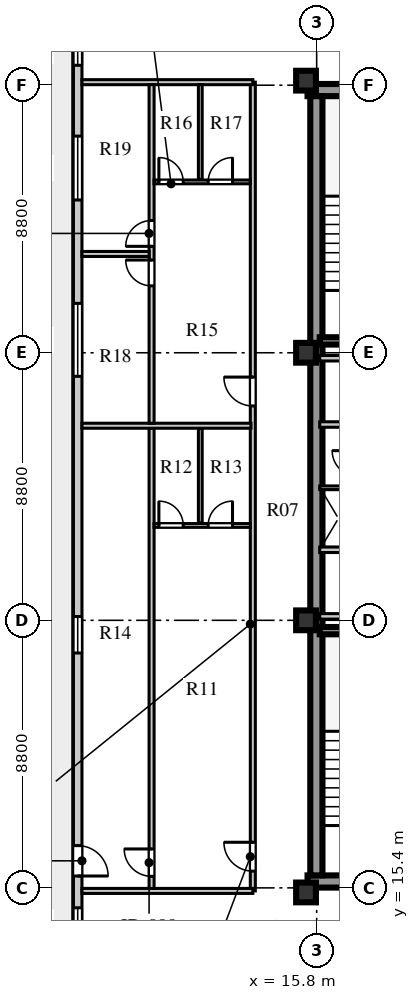
"""IFC4 building model, lengths in metres.
Left out: names, types, materials, properties, quantities, classifications, styles, units other than length and angle.
Written with IfcOpenShell. Run it as: python <this file> out.ifc"""

import sys

from ifc_helpers import new_model, si_unit, direction, frame, frame_2d, origin, origin_2d, place, context, subcontext, project, spatial, rectangle, extrude, element, fill, save


model = new_model("IFC4")
c1 = context("Model", 3, precision=1e-05, world=origin(), true_north=direction((0.0, 1.0)))
c2 = subcontext(c1, "Body", "Model", "MODEL_VIEW")
j1 = project(units=[si_unit("LENGTHUNIT", "METRE"), si_unit("PLANEANGLEUNIT", "RADIAN")], contexts=[c1])
p1 = place(None, origin())
s1 = spatial("IfcSite", under=j1, at=p1, CompositionType="ELEMENT")
p2 = place(p1, origin())
s2 = spatial("IfcBuilding", under=s1, at=p2, CompositionType="ELEMENT")
p3 = place(p2, frame((0.0, 0.0, 253.1)))
s3 = spatial("IfcBuildingStorey", under=s2, at=p3, CompositionType="ELEMENT", Elevation=253.1)
for number, where, z_axis, x_axis in (
    (1, (15.5, 15.61, 0.0), (0.0, 0.0, 1.0), (1.0, 0.0, 0.0)),
    (2, (15.5, 41.64, 0.0), (0.0, 0.0, 1.0), (1.0, 0.0, 0.0)),
):
    element("IfcWall", number, at=place(p3, frame(where, z_axis=z_axis, x_axis=x_axis)), inside=s3, PredefinedType="SHEAR", context=c2, shape_type="SweptSolid", body=[
        extrude(rectangle(XDim=9.48, YDim=0.4, at=frame_2d((4.74, 0.0))), origin(), (0.0, 0.0, 1.0), 3.66),
    ])
p4 = place(p3, frame((15.79, 15.81, 0.0), z_axis=(0.0, 0.0, 1.0), x_axis=(0.0, 1.0, 0.0)))
e3 = element("IfcWall", 3, at=p4, inside=s3, PredefinedType="SHEAR", context=c2, shape_type="SweptSolid", body=[
    extrude(rectangle(XDim=25.63, YDim=0.4, at=frame_2d((12.815, 0.0))), origin(), (0.0, 0.0, 1.0), 3.66),
])
for number, where, z_axis, x_axis in (
    (4, (15.45, 15.25, 0.0), (0.0, 0.0, 1.0), (1.0, 0.0, 0.0)),
    (5, (15.45, 24.2, 0.0), (0.0, 0.0, 1.0), (1.0, 0.0, 0.0)),
    (6, (15.45, 33.0, 0.0), (0.0, 0.0, 1.0), (1.0, 0.0, 0.0)),
    (7, (15.45, 41.95, 0.0), (0.0, 0.0, 1.0), (1.0, 0.0, 0.0)),
):
    element("IfcColumn", number, at=place(p3, frame(where, z_axis=z_axis, x_axis=x_axis)), inside=s3, PredefinedType="COLUMN", context=c2, shape_type="SweptSolid", body=[
        extrude(rectangle(XDim=0.65, YDim=0.65, at=origin_2d()), origin(), (0.0, 0.0, 1.0), 3.66),
    ])
p5 = place(p3, frame((7.94, 44.07, 0.0), z_axis=(0.0, 0.0, 1.0), x_axis=(0.0, -1.0, 0.0)))
e8 = element("IfcWall", 8, at=p5, inside=s3, PredefinedType="STANDARD", context=c2, shape_type="SweptSolid", body=[
    extrude(rectangle(XDim=30.94, YDim=0.28, at=frame_2d((15.47, 0.0))), origin(), (0.0, 0.0, 1.0), 3.66),
])
p6 = place(p5, frame((29.325, 0.0, 0.8)))
e9 = element("IfcOpeningElement", 9, at=p6, cuts=e8, PredefinedType="OPENING", context=c2, shape_type="SweptSolid", body=[
    extrude(rectangle(XDim=0.95, YDim=1.65, at=frame_2d((0.475, 0.825))), frame((0.0, 0.15, 0.0), z_axis=(0.0, -1.0, 0.0), x_axis=(1.0, 0.0, 0.0)), (0.0, 0.0, 1.0), 0.3),
])
p7 = place(p5, frame((27.28, 0.0, 0.0)))
e10 = element("IfcOpeningElement", 10, at=p7, cuts=e8, PredefinedType="OPENING", context=c2, shape_type="SweptSolid", body=[
    extrude(rectangle(XDim=1.0, YDim=2.05, at=frame_2d((0.5, 1.025))), frame((0.0, 0.15, 0.0), z_axis=(0.0, -1.0, 0.0), x_axis=(1.0, 0.0, 0.0)), (0.0, 0.0, 1.0), 0.3),
])
p8 = place(p5, frame((19.745, 0.0, 0.8)))
e11 = element("IfcOpeningElement", 11, at=p8, cuts=e8, PredefinedType="OPENING", context=c2, shape_type="SweptSolid", body=[
    extrude(rectangle(XDim=1.2, YDim=1.75, at=frame_2d((0.6, 0.875))), frame((0.0, 0.15, 0.0), z_axis=(0.0, -1.0, 0.0), x_axis=(1.0, 0.0, 0.0)), (0.0, 0.0, 1.0), 0.3),
])
p9 = place(p5, frame((9.445, 0.0, 0.8)))
e12 = element("IfcOpeningElement", 12, at=p9, cuts=e8, PredefinedType="OPENING", context=c2, shape_type="SweptSolid", body=[
    extrude(rectangle(XDim=2.4, YDim=2.05, at=frame_2d((1.2, 1.025))), frame((0.0, 0.15, 0.0), z_axis=(0.0, -1.0, 0.0), x_axis=(1.0, 0.0, 0.0)), (0.0, 0.0, 1.0), 0.3),
])
p10 = place(p5, frame((3.945, 0.0, 0.8)))
e13 = element("IfcOpeningElement", 13, at=p10, cuts=e8, PredefinedType="OPENING", context=c2, shape_type="SweptSolid", body=[
    extrude(rectangle(XDim=2.1, YDim=1.95, at=frame_2d((1.05, 0.975))), frame((0.0, 0.15, 0.0), z_axis=(0.0, -1.0, 0.0), x_axis=(1.0, 0.0, 0.0)), (0.0, 0.0, 1.0), 0.3),
])
p11 = place(p5, frame((0.665, 0.0, 0.8)))
e14 = element("IfcOpeningElement", 14, at=p11, cuts=e8, PredefinedType="OPENING", context=c2, shape_type="SweptSolid", body=[
    extrude(rectangle(XDim=0.95, YDim=1.65, at=frame_2d((0.475, 0.825))), frame((0.0, 0.15, 0.0), z_axis=(0.0, -1.0, 0.0), x_axis=(1.0, 0.0, 0.0)), (0.0, 0.0, 1.0), 0.3),
])
p12 = place(p3, frame((15.9, 23.86, 0.0), z_axis=(0.0, 0.0, 1.0), x_axis=(1.0, 0.0, 0.0)))
e15 = element("IfcWall", 15, at=p12, inside=s3, PredefinedType="SHEAR", context=c2, shape_type="SweptSolid", body=[
    extrude(rectangle(XDim=3.52, YDim=0.24, at=frame_2d((1.76, 0.0))), origin(), (0.0, 0.0, 1.0), 3.9),
])
p13 = place(p3, frame((15.9, 26.52, 0.0), z_axis=(0.0, 0.0, 1.0), x_axis=(1.0, 0.0, 0.0)))
e16 = element("IfcWall", 16, at=p13, inside=s3, PredefinedType="SOLIDWALL", context=c2, shape_type="SweptSolid", body=[
    extrude(rectangle(XDim=8.68, YDim=0.18, at=frame_2d((4.34, 0.0))), origin(), (0.0, 0.0, 1.0), 3.66),
])
p14 = place(p13, frame((2.05, 0.0, 0.0)))
e17 = element("IfcOpeningElement", 17, at=p14, cuts=e16, PredefinedType="OPENING", context=c2, shape_type="SweptSolid", body=[
    extrude(rectangle(XDim=0.85, YDim=2.06, at=frame_2d((0.425, 1.03))), frame((0.0, 0.1, 0.0), z_axis=(0.0, -1.0, 0.0), x_axis=(1.0, 0.0, 0.0)), (0.0, 0.0, 1.0), 0.2),
])
p15 = place(p13, frame((5.2, 0.0, 0.0)))
e18 = element("IfcOpeningElement", 18, at=p15, cuts=e16, PredefinedType="OPENING", context=c2, shape_type="SweptSolid", body=[
    extrude(rectangle(XDim=0.95, YDim=2.1, at=frame_2d((0.475, 1.05))), frame((0.0, 0.1, 0.0), z_axis=(0.0, -1.0, 0.0), x_axis=(1.0, 0.0, 0.0)), (0.0, 0.0, 1.0), 0.2),
])
p16 = place(p3, frame((15.9, 24.33, 0.0), z_axis=(0.0, 0.0, 1.0), x_axis=(1.0, 0.0, 0.0)))
e19 = element("IfcWall", 19, at=p16, inside=s3, PredefinedType="SOLIDWALL", context=c2, shape_type="SweptSolid", body=[
    extrude(rectangle(XDim=8.68, YDim=0.18, at=frame_2d((4.34, 0.0))), origin(), (0.0, 0.0, 1.0), 3.06),
])
p17 = place(p3, frame((15.9, 28.56, 0.0), z_axis=(0.0, 0.0, 1.0), x_axis=(1.0, 0.0, 0.0)))
e20 = element("IfcWall", 20, at=p17, inside=s3, PredefinedType="PARTITIONING", context=c2, shape_type="SweptSolid", body=[
    extrude(rectangle(XDim=1.2, YDim=0.12, at=frame_2d((0.6, 0.0))), origin(), (0.0, 0.0, 1.0), 3.66),
])
p18 = place(p3, frame((15.9, 30.64, 0.0), z_axis=(0.0, 0.0, 1.0), x_axis=(1.0, 0.0, 0.0)))
e21 = element("IfcWall", 21, at=p18, inside=s3, PredefinedType="SOLIDWALL", context=c2, shape_type="SweptSolid", body=[
    extrude(rectangle(XDim=8.68, YDim=0.18, at=frame_2d((4.34, 0.0))), origin(), (0.0, 0.0, 1.0), 3.66),
])
p19 = place(p18, frame((3.7, 0.0, 0.0)))
e22 = element("IfcOpeningElement", 22, at=p19, cuts=e21, PredefinedType="OPENING", context=c2, shape_type="SweptSolid", body=[
    extrude(rectangle(XDim=0.95, YDim=2.1, at=frame_2d((0.475, 1.05))), frame((0.0, 0.1, 0.0), z_axis=(0.0, -1.0, 0.0), x_axis=(1.0, 0.0, 0.0)), (0.0, 0.0, 1.0), 0.2),
])
p20 = place(p3, frame((15.9, 32.82, 0.0), z_axis=(0.0, 0.0, 1.0), x_axis=(1.0, 0.0, 0.0)))
e23 = element("IfcWall", 23, at=p20, inside=s3, PredefinedType="SOLIDWALL", context=c2, shape_type="SweptSolid", body=[
    extrude(rectangle(XDim=8.68, YDim=0.18, at=frame_2d((4.34, 0.0))), origin(), (0.0, 0.0, 1.0), 3.06),
])
p21 = place(p3, frame((15.9, 33.39, 0.0), z_axis=(0.0, 0.0, 1.0), x_axis=(1.0, 0.0, 0.0)))
e24 = element("IfcWall", 24, at=p21, inside=s3, PredefinedType="SHEAR", context=c2, shape_type="SweptSolid", body=[
    extrude(rectangle(XDim=3.52, YDim=0.24, at=frame_2d((1.76, 0.0))), origin(), (0.0, 0.0, 1.0), 3.9),
])
p22 = place(p3, frame((13.7, 15.3, 0.0), z_axis=(0.0, 0.0, 1.0), x_axis=(0.0, 1.0, 0.0)))
e25 = element("IfcWall", 25, at=p22, inside=s3, PredefinedType="PARTITIONING", context=c2, shape_type="SweptSolid", body=[
    extrude(rectangle(XDim=26.6, YDim=0.165, at=frame_2d((13.3, 0.0))), origin(), (0.0, 0.0, 1.0), 3.66),
])
p23 = place(p22, frame((0.65, 0.0, 0.0)))
e26 = element("IfcOpeningElement", 26, at=p23, cuts=e25, PredefinedType="OPENING", context=c2, shape_type="SweptSolid", body=[
    extrude(rectangle(XDim=0.95, YDim=2.1, at=frame_2d((0.475, 1.05))), frame((0.0, 0.093, 0.0), z_axis=(0.0, -1.0, 0.0), x_axis=(1.0, 0.0, 0.0)), (0.0, 0.0, 1.0), 0.185),
])
p24 = place(p22, frame((15.95, 0.0, 0.0)))
e27 = element("IfcOpeningElement", 27, at=p24, cuts=e25, PredefinedType="OPENING", context=c2, shape_type="SweptSolid", body=[
    extrude(rectangle(XDim=0.95, YDim=2.1, at=frame_2d((0.475, 1.05))), frame((0.0, 0.093, 0.0), z_axis=(0.0, -1.0, 0.0), x_axis=(1.0, 0.0, 0.0)), (0.0, 0.0, 1.0), 0.185),
])
for number, where, z_axis, x_axis in (
    (28, (8.08, 15.3, 0.0), (0.0, 0.0, 1.0), (1.0, 0.0, 0.0)),
    (29, (8.08, 41.9, 0.0), (0.0, 0.0, 1.0), (1.0, 0.0, 0.0)),
):
    element("IfcWall", number, at=place(p3, frame(where, z_axis=z_axis, x_axis=x_axis)), inside=s3, PredefinedType="PARTITIONING", context=c2, shape_type="SweptSolid", body=[
        extrude(rectangle(XDim=5.62, YDim=0.165, at=frame_2d((2.81, 0.0))), origin(), (0.0, 0.0, 1.0), 3.21),
    ])
p25 = place(p3, frame((10.37, 15.38, 0.0), z_axis=(0.0, 0.0, 1.0), x_axis=(0.0, 1.0, 0.0)))
e30 = element("IfcWall", 30, at=p25, inside=s3, PredefinedType="PARTITIONING", context=c2, shape_type="SweptSolid", body=[
    extrude(rectangle(XDim=15.14, YDim=0.165, at=frame_2d((7.57, 0.0))), origin(), (0.0, 0.0, 1.0), 3.66),
])
p26 = place(p25, frame((0.4, 0.0, 0.0)))
e31 = element("IfcOpeningElement", 31, at=p26, cuts=e30, PredefinedType="OPENING", context=c2, shape_type="SweptSolid", body=[
    extrude(rectangle(XDim=0.9, YDim=2.08, at=frame_2d((0.45, 1.04))), frame((0.0, 0.093, 0.0), z_axis=(0.0, -1.0, 0.0), x_axis=(1.0, 0.0, 0.0)), (0.0, 0.0, 1.0), 0.185),
])
p27 = place(p3, frame((10.45, 27.32, 0.0), z_axis=(0.0, 0.0, 1.0), x_axis=(1.0, 0.0, 0.0)))
e32 = element("IfcWall", 32, at=p27, inside=s3, PredefinedType="PLUMBINGWALL", context=c2, shape_type="SweptSolid", body=[
    extrude(rectangle(XDim=3.17, YDim=0.125, at=frame_2d((1.585, 0.0))), origin(), (0.0, 0.0, 1.0), 3.66),
])
p28 = place(p27, frame((0.16, 0.0, 0.0)))
e33 = element("IfcOpeningElement", 33, at=p28, cuts=e32, PredefinedType="OPENING", context=c2, shape_type="SweptSolid", body=[
    extrude(rectangle(XDim=0.8, YDim=2.05, at=frame_2d((0.4, 1.025))), frame((0.0, 0.073, 0.0), z_axis=(0.0, -1.0, 0.0), x_axis=(1.0, 0.0, 0.0)), (0.0, 0.0, 1.0), 0.145),
])
p29 = place(p27, frame((1.782, 0.0, 0.0)))
e34 = element("IfcOpeningElement", 34, at=p29, cuts=e32, PredefinedType="OPENING", context=c2, shape_type="SweptSolid", body=[
    extrude(rectangle(XDim=0.8, YDim=2.05, at=frame_2d((0.4, 1.025))), frame((0.0, 0.073, 0.0), z_axis=(0.0, -1.0, 0.0), x_axis=(1.0, 0.0, 0.0)), (0.0, 0.0, 1.0), 0.145),
])
p30 = place(p3, frame((11.972, 27.4, 0.0), z_axis=(0.0, 0.0, 1.0), x_axis=(0.0, 1.0, 0.0)))
e35 = element("IfcWall", 35, at=p30, inside=s3, PredefinedType="PLUMBINGWALL", context=c2, shape_type="SweptSolid", body=[
    extrude(rectangle(XDim=3.12, YDim=0.125, at=frame_2d((1.56, 0.0))), origin(), (0.0, 0.0, 1.0), 3.66),
])
p31 = place(p3, frame((8.08, 30.6, 0.0), z_axis=(0.0, 0.0, 1.0), x_axis=(1.0, 0.0, 0.0)))
e36 = element("IfcWall", 36, at=p31, inside=s3, PredefinedType="PARTITIONING", context=c2, shape_type="SweptSolid", body=[
    extrude(rectangle(XDim=5.56, YDim=0.165, at=frame_2d((2.78, 0.0))), origin(), (0.0, 0.0, 1.0), 3.66),
])
p32 = place(p3, frame((10.37, 30.68, 0.0), z_axis=(0.0, 0.0, 1.0), x_axis=(0.0, 1.0, 0.0)))
e37 = element("IfcWall", 37, at=p32, inside=s3, PredefinedType="PARTITIONING", context=c2, shape_type="SweptSolid", body=[
    extrude(rectangle(XDim=11.14, YDim=0.165, at=frame_2d((5.57, 0.0))), origin(), (0.0, 0.0, 1.0), 3.66),
])
p33 = place(p32, frame((4.52, 0.0, 0.0)))
e38 = element("IfcOpeningElement", 38, at=p33, cuts=e37, PredefinedType="OPENING", context=c2, shape_type="SweptSolid", body=[
    extrude(rectangle(XDim=0.85, YDim=2.08, at=frame_2d((0.425, 1.04))), frame((0.0, 0.093, 0.0), z_axis=(0.0, -1.0, 0.0), x_axis=(1.0, 0.0, 0.0)), (0.0, 0.0, 1.0), 0.185),
])
p34 = place(p32, frame((5.82, 0.0, 0.0)))
e39 = element("IfcOpeningElement", 39, at=p34, cuts=e37, PredefinedType="OPENING", context=c2, shape_type="SweptSolid", body=[
    extrude(rectangle(XDim=0.85, YDim=2.08, at=frame_2d((0.425, 1.04))), frame((0.0, 0.093, 0.0), z_axis=(0.0, -1.0, 0.0), x_axis=(1.0, 0.0, 0.0)), (0.0, 0.0, 1.0), 0.185),
])
p35 = place(p3, frame((10.45, 38.62, 0.0), z_axis=(0.0, 0.0, 1.0), x_axis=(1.0, 0.0, 0.0)))
e40 = element("IfcWall", 40, at=p35, inside=s3, PredefinedType="PLUMBINGWALL", context=c2, shape_type="SweptSolid", body=[
    extrude(rectangle(XDim=3.17, YDim=0.125, at=frame_2d((1.585, 0.0))), origin(), (0.0, 0.0, 1.0), 3.66),
])
p36 = place(p35, frame((0.16, 0.0, 0.0)))
e41 = element("IfcOpeningElement", 41, at=p36, cuts=e40, PredefinedType="OPENING", context=c2, shape_type="SweptSolid", body=[
    extrude(rectangle(XDim=0.8, YDim=2.05, at=frame_2d((0.4, 1.025))), frame((0.0, 0.073, 0.0), z_axis=(0.0, -1.0, 0.0), x_axis=(1.0, 0.0, 0.0)), (0.0, 0.0, 1.0), 0.145),
])
p37 = place(p35, frame((1.782, 0.0, 0.0)))
e42 = element("IfcOpeningElement", 42, at=p37, cuts=e40, PredefinedType="OPENING", context=c2, shape_type="SweptSolid", body=[
    extrude(rectangle(XDim=0.8, YDim=2.05, at=frame_2d((0.4, 1.025))), frame((0.0, 0.073, 0.0), z_axis=(0.0, -1.0, 0.0), x_axis=(1.0, 0.0, 0.0)), (0.0, 0.0, 1.0), 0.145),
])
p38 = place(p3, frame((11.972, 38.7, 0.0), z_axis=(0.0, 0.0, 1.0), x_axis=(0.0, 1.0, 0.0)))
e43 = element("IfcWall", 43, at=p38, inside=s3, PredefinedType="PLUMBINGWALL", context=c2, shape_type="SweptSolid", body=[
    extrude(rectangle(XDim=3.12, YDim=0.125, at=frame_2d((1.56, 0.0))), origin(), (0.0, 0.0, 1.0), 3.66),
])
p39 = place(p3, frame((8.08, 36.25, 0.0), z_axis=(0.0, 0.0, 1.0), x_axis=(1.0, 0.0, 0.0)))
e44 = element("IfcWall", 44, at=p39, inside=s3, PredefinedType="PARTITIONING", context=c2, shape_type="SweptSolid", body=[
    extrude(rectangle(XDim=2.21, YDim=0.165, at=frame_2d((1.105, 0.0))), origin(), (0.0, 0.0, 1.0), 3.66),
])
p40 = place(p6, origin())
e45 = element("IfcWindow", 45, at=p40, inside=s3, PartitioningType="SINGLE_PANEL", PredefinedType="WINDOW", context=c2, shape_type="SweptSolid", body=[
    extrude(rectangle(XDim=0.95, YDim=1.65, at=frame_2d((0.475, 0.825))), frame((0.0, 0.03, 0.0), z_axis=(0.0, -1.0, 0.0), x_axis=(1.0, 0.0, 0.0)), (0.0, 0.0, 1.0), 0.06),
])
fill(e9, e45)
p41 = place(p7, frame((1.0, 0.0, 0.0), z_axis=(0.0, 0.0, 1.0), x_axis=(-1.0, 0.0, 0.0)))
e46 = element("IfcDoor", 46, at=p41, inside=s3, OperationType="SINGLE_SWING_LEFT", PredefinedType="DOOR", context=c2, shape_type="SweptSolid", body=[
    extrude(rectangle(XDim=1.0, YDim=2.05, at=frame_2d((0.5, 1.025))), frame((0.0, 0.025, 0.0), z_axis=(0.0, -1.0, 0.0), x_axis=(1.0, 0.0, 0.0)), (0.0, 0.0, 1.0), 0.05),
])
fill(e10, e46)
p42 = place(p8, origin())
e47 = element("IfcWindow", 47, at=p42, inside=s3, PartitioningType="SINGLE_PANEL", PredefinedType="WINDOW", context=c2, shape_type="SweptSolid", body=[
    extrude(rectangle(XDim=1.2, YDim=1.75, at=frame_2d((0.6, 0.875))), frame((0.0, 0.03, 0.0), z_axis=(0.0, -1.0, 0.0), x_axis=(1.0, 0.0, 0.0)), (0.0, 0.0, 1.0), 0.06),
])
fill(e11, e47)
p43 = place(p9, origin())
e48 = element("IfcWindow", 48, at=p43, inside=s3, PartitioningType="SINGLE_PANEL", PredefinedType="WINDOW", context=c2, shape_type="SweptSolid", body=[
    extrude(rectangle(XDim=2.4, YDim=2.05, at=frame_2d((1.2, 1.025))), frame((0.0, 0.03, 0.0), z_axis=(0.0, -1.0, 0.0), x_axis=(1.0, 0.0, 0.0)), (0.0, 0.0, 1.0), 0.06),
])
fill(e12, e48)
p44 = place(p10, origin())
e49 = element("IfcWindow", 49, at=p44, inside=s3, PartitioningType="SINGLE_PANEL", PredefinedType="WINDOW", context=c2, shape_type="SweptSolid", body=[
    extrude(rectangle(XDim=2.1, YDim=1.95, at=frame_2d((1.05, 0.975))), frame((0.0, 0.03, 0.0), z_axis=(0.0, -1.0, 0.0), x_axis=(1.0, 0.0, 0.0)), (0.0, 0.0, 1.0), 0.06),
])
fill(e13, e49)
p45 = place(p11, origin())
e50 = element("IfcWindow", 50, at=p45, inside=s3, PartitioningType="SINGLE_PANEL", PredefinedType="WINDOW", context=c2, shape_type="SweptSolid", body=[
    extrude(rectangle(XDim=0.95, YDim=1.65, at=frame_2d((0.475, 0.825))), frame((0.0, 0.03, 0.0), z_axis=(0.0, -1.0, 0.0), x_axis=(1.0, 0.0, 0.0)), (0.0, 0.0, 1.0), 0.06),
])
fill(e14, e50)
p46 = place(p28, origin())
e51 = element("IfcDoor", 51, at=p46, inside=s3, OperationType="SINGLE_SWING_LEFT", PredefinedType="DOOR", context=c2, shape_type="SweptSolid", body=[
    extrude(rectangle(XDim=0.8, YDim=2.05, at=frame_2d((0.4, 1.025))), frame((0.0, 0.025, 0.0), z_axis=(0.0, -1.0, 0.0), x_axis=(1.0, 0.0, 0.0)), (0.0, 0.0, 1.0), 0.05),
])
fill(e33, e51)
p47 = place(p29, origin())
e52 = element("IfcDoor", 52, at=p47, inside=s3, OperationType="SINGLE_SWING_RIGHT", PredefinedType="DOOR", context=c2, shape_type="SweptSolid", body=[
    extrude(rectangle(XDim=0.8, YDim=2.05, at=frame_2d((0.4, 1.025))), frame((0.0, 0.025, 0.0), z_axis=(0.0, -1.0, 0.0), x_axis=(1.0, 0.0, 0.0)), (0.0, 0.0, 1.0), 0.05),
])
fill(e34, e52)
p48 = place(p26, frame((0.9, 0.0, 0.0), z_axis=(0.0, 0.0, 1.0), x_axis=(-1.0, 0.0, 0.0)))
e53 = element("IfcDoor", 53, at=p48, inside=s3, OperationType="SINGLE_SWING_LEFT", PredefinedType="DOOR", context=c2, shape_type="SweptSolid", body=[
    extrude(rectangle(XDim=0.9, YDim=2.08, at=frame_2d((0.45, 1.04))), frame((0.0, 0.025, 0.0), z_axis=(0.0, -1.0, 0.0), x_axis=(1.0, 0.0, 0.0)), (0.0, 0.0, 1.0), 0.05),
])
fill(e31, e53)
p49 = place(p23, frame((0.95, 0.0, 0.0), z_axis=(0.0, 0.0, 1.0), x_axis=(-1.0, 0.0, 0.0)))
e54 = element("IfcDoor", 54, at=p49, inside=s3, OperationType="SINGLE_SWING_LEFT", PredefinedType="DOOR", context=c2, shape_type="SweptSolid", body=[
    extrude(rectangle(XDim=0.95, YDim=2.1, at=frame_2d((0.475, 1.05))), frame((0.0, 0.025, 0.0), z_axis=(0.0, -1.0, 0.0), x_axis=(1.0, 0.0, 0.0)), (0.0, 0.0, 1.0), 0.05),
])
fill(e26, e54)
p50 = place(p36, origin())
e55 = element("IfcDoor", 55, at=p50, inside=s3, OperationType="SINGLE_SWING_LEFT", PredefinedType="DOOR", context=c2, shape_type="SweptSolid", body=[
    extrude(rectangle(XDim=0.8, YDim=2.05, at=frame_2d((0.4, 1.025))), frame((0.0, 0.025, 0.0), z_axis=(0.0, -1.0, 0.0), x_axis=(1.0, 0.0, 0.0)), (0.0, 0.0, 1.0), 0.05),
])
fill(e41, e55)
p51 = place(p37, origin())
e56 = element("IfcDoor", 56, at=p51, inside=s3, OperationType="SINGLE_SWING_RIGHT", PredefinedType="DOOR", context=c2, shape_type="SweptSolid", body=[
    extrude(rectangle(XDim=0.8, YDim=2.05, at=frame_2d((0.4, 1.025))), frame((0.0, 0.025, 0.0), z_axis=(0.0, -1.0, 0.0), x_axis=(1.0, 0.0, 0.0)), (0.0, 0.0, 1.0), 0.05),
])
fill(e42, e56)
p52 = place(p33, frame((0.85, 0.0, 0.0), z_axis=(0.0, 0.0, 1.0), x_axis=(-1.0, 0.0, 0.0)))
e57 = element("IfcDoor", 57, at=p52, inside=s3, OperationType="SINGLE_SWING_LEFT", PredefinedType="DOOR", context=c2, shape_type="SweptSolid", body=[
    extrude(rectangle(XDim=0.85, YDim=2.08, at=frame_2d((0.425, 1.04))), frame((0.0, 0.025, 0.0), z_axis=(0.0, -1.0, 0.0), x_axis=(1.0, 0.0, 0.0)), (0.0, 0.0, 1.0), 0.05),
])
fill(e38, e57)
p53 = place(p34, frame((0.85, 0.0, 0.0), z_axis=(0.0, 0.0, 1.0), x_axis=(-1.0, 0.0, 0.0)))
e58 = element("IfcDoor", 58, at=p53, inside=s3, OperationType="SINGLE_SWING_RIGHT", PredefinedType="DOOR", context=c2, shape_type="SweptSolid", body=[
    extrude(rectangle(XDim=0.85, YDim=2.08, at=frame_2d((0.425, 1.04))), frame((0.0, 0.025, 0.0), z_axis=(0.0, -1.0, 0.0), x_axis=(1.0, 0.0, 0.0)), (0.0, 0.0, 1.0), 0.05),
])
fill(e39, e58)
p54 = place(p24, frame((0.95, 0.0, 0.0), z_axis=(0.0, 0.0, 1.0), x_axis=(-1.0, 0.0, 0.0)))
e59 = element("IfcDoor", 59, at=p54, inside=s3, OperationType="SINGLE_SWING_LEFT", PredefinedType="DOOR", context=c2, shape_type="SweptSolid", body=[
    extrude(rectangle(XDim=0.95, YDim=2.1, at=frame_2d((0.475, 1.05))), frame((0.0, 0.025, 0.0), z_axis=(0.0, -1.0, 0.0), x_axis=(1.0, 0.0, 0.0)), (0.0, 0.0, 1.0), 0.05),
])
fill(e27, e59)
save(model, sys.argv[1])
